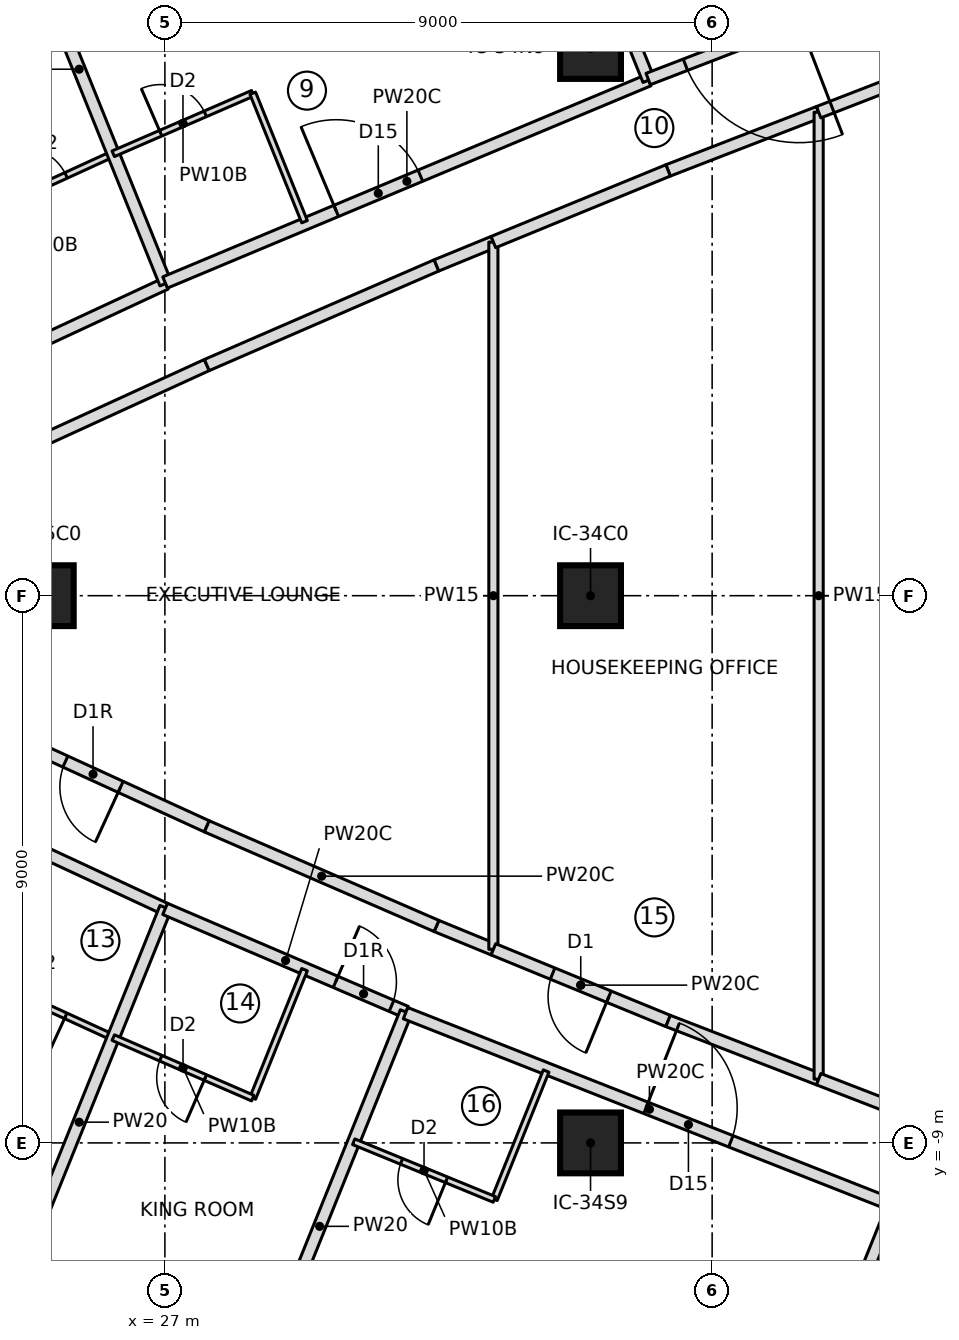
"""IFC4 building model, lengths in metres.
Left out: names, types, materials, properties, quantities, classifications, styles, units other than length and angle.
Written with IfcOpenShell. Run it as: python <this file> out.ifc"""

import sys

from ifc_helpers import new_model, si_unit, direction, frame, frame_2d, origin, origin_2d, place, context, subcontext, project, spatial, rectangle, extrude, element, fill, save


model = new_model("IFC4")
c1 = context("Model", 3, precision=1e-05, world=origin(), true_north=direction((0.0, 1.0)))
c2 = subcontext(c1, "Body", "Model", "MODEL_VIEW")
j1 = project(units=[si_unit("LENGTHUNIT", "METRE"), si_unit("PLANEANGLEUNIT", "RADIAN")], contexts=[c1])
p1 = place(None, origin())
s1 = spatial("IfcSite", under=j1, at=p1, CompositionType="ELEMENT")
p2 = place(p1, origin())
s2 = spatial("IfcBuilding", under=s1, at=p2, CompositionType="ELEMENT")
p3 = place(p2, frame((0.0, 0.0, 200.35)))
s3 = spatial("IfcBuildingStorey", under=s2, at=p3, CompositionType="ELEMENT", Elevation=200.35)
for number, where, z_axis, x_axis in (
    (1, (25.0, 0.0, 0.0), (0.0, 0.0, 1.0), (1.0, 0.0, 0.0)),
    (2, (34.0, -9.0, 0.0), (0.0, 0.0, 1.0), (1.0, 0.0, 0.0)),
    (3, (34.0, 0.0, 0.0), (0.0, 0.0, 1.0), (1.0, 0.0, 0.0)),
    (4, (34.0, 9.0, 0.0), (0.0, 0.0, 1.0), (1.0, 0.0, 0.0)),
):
    element("IfcColumn", number, at=place(p3, frame(where, z_axis=z_axis, x_axis=x_axis)), inside=s3, PredefinedType="COLUMN", context=c2, shape_type="SweptSolid", body=[
        extrude(rectangle(XDim=1.0, YDim=1.0, at=origin_2d()), origin(), (0.0, 0.0, 1.0), 3.55),
    ])
p4 = place(p3, frame((21.704, 2.663, 0.0), z_axis=(0.0, 0.0, 1.0), x_axis=(0.906619470853, 0.421949209112, 0.0)))
e5 = element("IfcWall", 5, at=p4, inside=s3, PredefinedType="PARTITIONING", context=c2, shape_type="SweptSolid", body=[
    extrude(rectangle(XDim=5.854, YDim=0.2, at=frame_2d((2.927, 0.0))), origin(), (0.0, 0.0, 1.0), 3.25),
])
p5 = place(p4, frame((0.55, 0.0, 0.0)))
e6 = element("IfcOpeningElement", 6, at=p5, cuts=e5, PredefinedType="OPENING", context=c2, shape_type="SweptSolid", body=[
    extrude(rectangle(XDim=1.5, YDim=2.1, at=frame_2d((0.75, 1.05))), frame((0.0, 0.11, 0.0), z_axis=(0.0, -1.0, 0.0), x_axis=(1.0, 0.0, 0.0)), (0.0, 0.0, 1.0), 0.22),
])
p6 = place(p3, frame((23.875, 6.226, 0.0), z_axis=(0.0, 0.0, 1.0), x_axis=(0.909145169949, 0.416479363183, 0.0)))
e7 = element("IfcWall", 7, at=p6, inside=s3, PredefinedType="PARTITIONING", context=c2, shape_type="SweptSolid", body=[
    extrude(rectangle(XDim=2.493, YDim=0.1, at=frame_2d((1.247, 0.0))), origin(), (0.0, 0.0, 1.0), 3.25),
])
p7 = place(p6, frame((0.85, 0.0, 0.0)))
e8 = element("IfcOpeningElement", 8, at=p7, cuts=e7, PredefinedType="OPENING", context=c2, shape_type="SweptSolid", body=[
    extrude(rectangle(XDim=0.8, YDim=2.1, at=frame_2d((0.4, 1.05))), frame((0.0, 0.06, 0.0), z_axis=(0.0, -1.0, 0.0), x_axis=(1.0, 0.0, 0.0)), (0.0, 0.0, 1.0), 0.12),
])
p8 = place(p3, frame((27.012, 5.133, 0.0), z_axis=(0.0, 0.0, 1.0), x_axis=(-0.373913547423, 0.927463562116, 0.0)))
e9 = element("IfcWall", 9, at=p8, inside=s3, PredefinedType="PARTITIONING", context=c2, shape_type="SweptSolid", body=[
    extrude(rectangle(XDim=7.604, YDim=0.2, at=frame_2d((3.802, 0.0))), origin(), (0.0, 0.0, 1.0), 3.25),
])
p9 = place(p3, frame((27.004, 5.151, 0.0), z_axis=(0.0, 0.0, 1.0), x_axis=(0.922490953728, 0.386018704586, 0.0)))
e10 = element("IfcWall", 10, at=p9, inside=s3, PredefinedType="PARTITIONING", context=c2, shape_type="SweptSolid", body=[
    extrude(rectangle(XDim=8.62, YDim=0.2, at=frame_2d((4.31, 0.0))), origin(), (0.0, 0.0, 1.0), 3.25),
])
p10 = place(p9, frame((3.05, 0.0, 0.0)))
e11 = element("IfcOpeningElement", 11, at=p10, cuts=e10, PredefinedType="OPENING", context=c2, shape_type="SweptSolid", body=[
    extrude(rectangle(XDim=1.5, YDim=2.1, at=frame_2d((0.75, 1.05))), frame((0.0, 0.11, 0.0), z_axis=(0.0, -1.0, 0.0), x_axis=(1.0, 0.0, 0.0)), (0.0, 0.0, 1.0), 0.22),
])
p11 = place(p3, frame((26.151, 7.268, 0.0), z_axis=(0.0, 0.0, 1.0), x_axis=(0.917378641232, 0.398015613526, 0.0)))
e12 = element("IfcWall", 12, at=p11, inside=s3, PredefinedType="PARTITIONING", context=c2, shape_type="SweptSolid", body=[
    extrude(rectangle(XDim=2.501, YDim=0.1, at=frame_2d((1.25, 0.0))), origin(), (0.0, 0.0, 1.0), 3.25),
])
p12 = place(p11, frame((0.85, 0.0, 0.0)))
e13 = element("IfcOpeningElement", 13, at=p12, cuts=e12, PredefinedType="OPENING", context=c2, shape_type="SweptSolid", body=[
    extrude(rectangle(XDim=0.8, YDim=2.1, at=frame_2d((0.4, 1.05))), frame((0.0, 0.06, 0.0), z_axis=(0.0, -1.0, 0.0), x_axis=(1.0, 0.0, 0.0)), (0.0, 0.0, 1.0), 0.12),
])
p13 = place(p3, frame((28.445, 8.263, 0.0), z_axis=(0.0, 0.0, 1.0), x_axis=(0.373902898623, -0.927467855185, 0.0)))
e14 = element("IfcWall", 14, at=p13, inside=s3, PredefinedType="PARTITIONING", context=c2, shape_type="SweptSolid", body=[
    extrude(rectangle(XDim=2.278, YDim=0.1, at=frame_2d((1.139, 0.0))), origin(), (0.0, 0.0, 1.0), 3.25),
])
p14 = place(p3, frame((34.956, 8.479, 0.0), z_axis=(0.0, 0.0, 1.0), x_axis=(-0.373881438439, 0.927476506436, 0.0)))
e15 = element("IfcWall", 15, at=p14, inside=s3, PredefinedType="PARTITIONING", context=c2, shape_type="SweptSolid", body=[
    extrude(rectangle(XDim=7.601, YDim=0.2, at=frame_2d((3.8, 0.0))), origin(), (0.0, 0.0, 1.0), 3.25),
])
p15 = place(p3, frame((38.972, 10.045, 0.0), z_axis=(0.0, 0.0, 1.0), x_axis=(-0.93335728106, -0.358948723208, 0.0)))
e16 = element("IfcWall", 16, at=p15, inside=s3, PredefinedType="PARTITIONING", context=c2, shape_type="SweptSolid", body=[
    extrude(rectangle(XDim=4.312, YDim=0.2, at=frame_2d((2.156, 0.0))), origin(), (0.0, 0.0, 1.0), 3.25),
])
p16 = place(p15, frame((1.656, 0.0, 0.0)))
e17 = element("IfcOpeningElement", 17, at=p16, cuts=e16, PredefinedType="OPENING", context=c2, shape_type="SweptSolid", body=[
    extrude(rectangle(XDim=2.0, YDim=2.4, at=frame_2d((1.0, 1.2))), frame((0.0, 0.11, 0.0), z_axis=(0.0, -1.0, 0.0), x_axis=(1.0, 0.0, 0.0)), (0.0, 0.0, 1.0), 0.22),
])
p17 = place(p3, frame((21.704, -2.685, 0.0), z_axis=(0.0, 0.0, 1.0), x_axis=(0.906628613993, -0.421929563184, 0.0)))
e18 = element("IfcWall", 18, at=p17, inside=s3, PredefinedType="PARTITIONING", context=c2, shape_type="SweptSolid", body=[
    extrude(rectangle(XDim=5.846, YDim=0.2, at=frame_2d((2.923, 0.0))), origin(), (0.0, 0.0, 1.0), 3.25),
])
p18 = place(p17, frame((0.55, 0.0, 0.0)))
e19 = element("IfcOpeningElement", 19, at=p18, cuts=e18, PredefinedType="OPENING", context=c2, shape_type="SweptSolid", body=[
    extrude(rectangle(XDim=1.5, YDim=2.1, at=frame_2d((0.75, 1.05))), frame((0.0, 0.11, 0.0), z_axis=(0.0, -1.0, 0.0), x_axis=(1.0, 0.0, 0.0)), (0.0, 0.0, 1.0), 0.22),
])
p19 = place(p3, frame((26.142, -7.264, 0.0), z_axis=(0.0, 0.0, 1.0), x_axis=(-0.909145169949, 0.416479363183, 0.0)))
e20 = element("IfcWall", 20, at=p19, inside=s3, PredefinedType="PARTITIONING", context=c2, shape_type="SweptSolid", body=[
    extrude(rectangle(XDim=2.493, YDim=0.1, at=frame_2d((1.247, 0.0))), origin(), (0.0, 0.0, 1.0), 3.25),
])
p20 = place(p19, frame((0.85, 0.0, 0.0)))
e21 = element("IfcOpeningElement", 21, at=p20, cuts=e20, PredefinedType="OPENING", context=c2, shape_type="SweptSolid", body=[
    extrude(rectangle(XDim=0.8, YDim=2.1, at=frame_2d((0.4, 1.05))), frame((0.0, 0.06, 0.0), z_axis=(0.0, -1.0, 0.0), x_axis=(1.0, 0.0, 0.0)), (0.0, 0.0, 1.0), 0.12),
])
p21 = place(p3, frame((24.168, -12.185, 0.0), z_axis=(0.0, 0.0, 1.0), x_axis=(0.373913547423, 0.927463562116, 0.0)))
e22 = element("IfcWall", 22, at=p21, inside=s3, PredefinedType="PARTITIONING", context=c2, shape_type="SweptSolid", body=[
    extrude(rectangle(XDim=7.604, YDim=0.2, at=frame_2d((3.802, 0.0))), origin(), (0.0, 0.0, 1.0), 3.25),
])
p22 = place(p3, frame((27.004, -5.151, 0.0), z_axis=(0.0, 0.0, 1.0), x_axis=(0.919259282109, -0.393652603519, 0.0)))
e23 = element("IfcWall", 23, at=p22, inside=s3, PredefinedType="PARTITIONING", context=c2, shape_type="SweptSolid", body=[
    extrude(rectangle(XDim=4.309, YDim=0.2, at=frame_2d((2.155, 0.0))), origin(), (0.0, 0.0, 1.0), 3.25),
])
p23 = place(p22, frame((3.05, 0.0, 0.0)))
e24 = element("IfcOpeningElement", 24, at=p23, cuts=e23, PredefinedType="OPENING", context=c2, shape_type="SweptSolid", body=[
    extrude(rectangle(XDim=1.0, YDim=2.1, at=frame_2d((0.5, 1.05))), frame((0.0, 0.11, 0.0), z_axis=(0.0, -1.0, 0.0), x_axis=(1.0, 0.0, 0.0)), (0.0, 0.0, 1.0), 0.22),
])
p24 = place(p3, frame((29.297, -6.151, 0.0), z_axis=(0.0, 0.0, 1.0), x_axis=(-0.373902898623, -0.927467855185, 0.0)))
e25 = element("IfcWall", 25, at=p24, inside=s3, PredefinedType="PARTITIONING", context=c2, shape_type="SweptSolid", body=[
    extrude(rectangle(XDim=2.278, YDim=0.1, at=frame_2d((1.139, 0.0))), origin(), (0.0, 0.0, 1.0), 3.25),
])
p25 = place(p3, frame((28.445, -8.263, 0.0), z_axis=(0.0, 0.0, 1.0), x_axis=(-0.917378641232, 0.398015613526, 0.0)))
e26 = element("IfcWall", 26, at=p25, inside=s3, PredefinedType="PARTITIONING", context=c2, shape_type="SweptSolid", body=[
    extrude(rectangle(XDim=2.501, YDim=0.1, at=frame_2d((1.25, 0.0))), origin(), (0.0, 0.0, 1.0), 3.25),
])
p26 = place(p25, frame((0.85, 0.0, 0.0)))
e27 = element("IfcOpeningElement", 27, at=p26, cuts=e26, PredefinedType="OPENING", context=c2, shape_type="SweptSolid", body=[
    extrude(rectangle(XDim=0.8, YDim=2.1, at=frame_2d((0.4, 1.05))), frame((0.0, 0.06, 0.0), z_axis=(0.0, -1.0, 0.0), x_axis=(1.0, 0.0, 0.0)), (0.0, 0.0, 1.0), 0.12),
])
p27 = place(p3, frame((28.124, -13.897, 0.0), z_axis=(0.0, 0.0, 1.0), x_axis=(0.373876084216, 0.927478664796, 0.0)))
e28 = element("IfcWall", 28, at=p27, inside=s3, PredefinedType="PARTITIONING", context=c2, shape_type="SweptSolid", body=[
    extrude(rectangle(XDim=7.6, YDim=0.2, at=frame_2d((3.8, 0.0))), origin(), (0.0, 0.0, 1.0), 3.25),
])
p28 = place(p3, frame((30.958, -6.866, 0.0), z_axis=(0.0, 0.0, 1.0), x_axis=(0.93040517394, -0.366532689274, 0.0)))
e29 = element("IfcWall", 29, at=p28, inside=s3, PredefinedType="PARTITIONING", context=c2, shape_type="SweptSolid", body=[
    extrude(rectangle(XDim=8.622, YDim=0.2, at=frame_2d((4.311, 0.0))), origin(), (0.0, 0.0, 1.0), 3.25),
])
p29 = place(p28, frame((4.25, 0.0, 0.0)))
e30 = element("IfcOpeningElement", 30, at=p29, cuts=e29, PredefinedType="OPENING", context=c2, shape_type="SweptSolid", body=[
    extrude(rectangle(XDim=1.5, YDim=2.1, at=frame_2d((0.75, 1.05))), frame((0.0, 0.11, 0.0), z_axis=(0.0, -1.0, 0.0), x_axis=(1.0, 0.0, 0.0)), (0.0, 0.0, 1.0), 0.22),
])
p30 = place(p3, frame((33.27, -7.818, 0.0), z_axis=(0.0, 0.0, 1.0), x_axis=(-0.373847853912, -0.927490044219, 0.0)))
e31 = element("IfcWall", 31, at=p30, inside=s3, PredefinedType="PARTITIONING", context=c2, shape_type="SweptSolid", body=[
    extrude(rectangle(XDim=2.277, YDim=0.1, at=frame_2d((1.139, 0.0))), origin(), (0.0, 0.0, 1.0), 3.25),
])
p31 = place(p3, frame((32.418, -9.93, 0.0), z_axis=(0.0, 0.0, 1.0), x_axis=(-0.92519499486, 0.379492057212, 0.0)))
e32 = element("IfcWall", 32, at=p31, inside=s3, PredefinedType="PARTITIONING", context=c2, shape_type="SweptSolid", body=[
    extrude(rectangle(XDim=2.5, YDim=0.1, at=frame_2d((1.25, 0.0))), origin(), (0.0, 0.0, 1.0), 3.25),
])
p32 = place(p31, frame((0.85, 0.0, 0.0)))
e33 = element("IfcOpeningElement", 33, at=p32, cuts=e32, PredefinedType="OPENING", context=c2, shape_type="SweptSolid", body=[
    extrude(rectangle(XDim=0.8, YDim=2.1, at=frame_2d((0.4, 1.05))), frame((0.0, 0.06, 0.0), z_axis=(0.0, -1.0, 0.0), x_axis=(1.0, 0.0, 0.0)), (0.0, 0.0, 1.0), 0.12),
])
p33 = place(p3, frame((36.137, -17.079, 0.0), z_axis=(0.0, 0.0, 1.0), x_axis=(0.373863662938, 0.927483671843, 0.0)))
e34 = element("IfcWall", 34, at=p33, inside=s3, PredefinedType="PARTITIONING", context=c2, shape_type="SweptSolid", body=[
    extrude(rectangle(XDim=7.604, YDim=0.2, at=frame_2d((3.802, 0.0))), origin(), (0.0, 0.0, 1.0), 3.25),
])
p34 = place(p3, frame((27.69, -3.793, 0.0), z_axis=(0.0, 0.0, 1.0), x_axis=(-0.909180834404, 0.416401501382, 0.0)))
e35 = element("IfcWall", 35, at=p34, inside=s3, PredefinedType="PARTITIONING", context=c2, shape_type="SweptSolid", body=[
    extrude(rectangle(XDim=4.117, YDim=0.2, at=frame_2d((2.059, 0.0))), origin(), (0.0, 0.0, 1.0), 3.25),
])
p35 = place(p34, frame((1.559, 0.0, 0.0)))
e36 = element("IfcOpeningElement", 36, at=p35, cuts=e35, PredefinedType="OPENING", context=c2, shape_type="SweptSolid", body=[
    extrude(rectangle(XDim=1.0, YDim=2.1, at=frame_2d((0.5, 1.05))), frame((0.0, 0.11, 0.0), z_axis=(0.0, -1.0, 0.0), x_axis=(1.0, 0.0, 0.0)), (0.0, 0.0, 1.0), 0.22),
])
p36 = place(p3, frame((32.402, -5.816, 0.0), z_axis=(0.0, 0.0, 1.0), x_axis=(-0.925212079844, 0.379450401648, 0.0)))
e37 = element("IfcWall", 37, at=p36, inside=s3, PredefinedType="PARTITIONING", context=c2, shape_type="SweptSolid", body=[
    extrude(rectangle(XDim=1.011, YDim=0.2, at=frame_2d((0.506, 0.0))), origin(), (0.0, 0.0, 1.0), 3.25),
])
p37 = place(p3, frame((31.467, -5.432, 0.0), z_axis=(0.0, 0.0, 1.0), x_axis=(-0.917375244839, 0.398023441717, 0.0)))
e38 = element("IfcWall", 38, at=p37, inside=s3, PredefinedType="PARTITIONING", context=c2, shape_type="SweptSolid", body=[
    extrude(rectangle(XDim=4.117, YDim=0.2, at=frame_2d((2.059, 0.0))), origin(), (0.0, 0.0, 1.0), 3.25),
])
p38 = place(p3, frame((23.947, 2.079, 0.0), z_axis=(0.0, 0.0, 1.0), x_axis=(0.909180834404, 0.416401501382, 0.0)))
e39 = element("IfcWall", 39, at=p38, inside=s3, PredefinedType="PARTITIONING", context=c2, shape_type="SweptSolid", body=[
    extrude(rectangle(XDim=4.117, YDim=0.2, at=frame_2d((2.059, 0.0))), origin(), (0.0, 0.0, 1.0), 3.25),
])
p39 = place(p3, frame((27.69, 3.793, 0.0), z_axis=(0.0, 0.0, 1.0), x_axis=(0.917375244839, 0.398023441717, 0.0)))
e40 = element("IfcWall", 40, at=p39, inside=s3, PredefinedType="PARTITIONING", context=c2, shape_type="SweptSolid", body=[
    extrude(rectangle(XDim=4.117, YDim=0.2, at=frame_2d((2.059, 0.0))), origin(), (0.0, 0.0, 1.0), 3.25),
])
p40 = place(p3, frame((31.467, 5.432, 0.0), z_axis=(0.0, 0.0, 1.0), x_axis=(0.925212079844, 0.379450401648, 0.0)))
e41 = element("IfcWall", 41, at=p40, inside=s3, PredefinedType="PARTITIONING", context=c2, shape_type="SweptSolid", body=[
    extrude(rectangle(XDim=1.011, YDim=0.2, at=frame_2d((0.506, 0.0))), origin(), (0.0, 0.0, 1.0), 3.25),
])
p41 = place(p3, frame((32.402, -5.816, 0.0), z_axis=(0.0, 0.0, 1.0), x_axis=(0.0, 1.0, 0.0)))
e42 = element("IfcWall", 42, at=p41, inside=s3, PredefinedType="PARTITIONING", context=c2, shape_type="SweptSolid", body=[
    extrude(rectangle(XDim=11.632, YDim=0.15, at=frame_2d((5.816, 0.0))), origin(), (0.0, 0.0, 1.0), 3.25),
])
p42 = place(p3, frame((35.276, -6.994, 0.0), z_axis=(0.0, 0.0, 1.0), x_axis=(-0.925204713675, 0.379468362045, 0.0)))
e43 = element("IfcWall", 43, at=p42, inside=s3, PredefinedType="PARTITIONING", context=c2, shape_type="SweptSolid", body=[
    extrude(rectangle(XDim=3.105, YDim=0.2, at=frame_2d((1.553, 0.0))), origin(), (0.0, 0.0, 1.0), 3.25),
])
p43 = place(p42, frame((1.053, 0.0, 0.0)))
e44 = element("IfcOpeningElement", 44, at=p43, cuts=e43, PredefinedType="OPENING", context=c2, shape_type="SweptSolid", body=[
    extrude(rectangle(XDim=1.0, YDim=2.1, at=frame_2d((0.5, 1.05))), frame((0.0, 0.11, 0.0), z_axis=(0.0, -1.0, 0.0), x_axis=(1.0, 0.0, 0.0)), (0.0, 0.0, 1.0), 0.22),
])
for number, where, z_axis, x_axis in (
    (45, (35.276, 6.994, 0.0), (0.0, 0.0, 1.0), (0.933, 0.361, 0.0)),
    (46, (37.752, -7.952, 0.0), (0.0, 0.0, 1.0), (-0.933, 0.361, 0.0)),
):
    element("IfcWall", number, at=place(p3, frame(where, z_axis=z_axis, x_axis=x_axis)), inside=s3, PredefinedType="PARTITIONING", context=c2, shape_type="SweptSolid", body=[
        extrude(rectangle(XDim=2.655, YDim=0.2, at=frame_2d((1.327, 0.0))), origin(), (0.0, 0.0, 1.0), 3.25),
    ])
p44 = place(p3, frame((32.402, 5.816, 0.0), z_axis=(0.0, 0.0, 1.0), x_axis=(0.925204713675, 0.379468362045, 0.0)))
e47 = element("IfcWall", 47, at=p44, inside=s3, PredefinedType="PARTITIONING", context=c2, shape_type="SweptSolid", body=[
    extrude(rectangle(XDim=3.105, YDim=0.2, at=frame_2d((1.553, 0.0))), origin(), (0.0, 0.0, 1.0), 3.25),
])
p45 = place(p3, frame((37.752, -7.952, 0.0), z_axis=(0.0, 0.0, 1.0), x_axis=(0.0, 1.0, 0.0)))
e48 = element("IfcWall", 48, at=p45, inside=s3, PredefinedType="PARTITIONING", context=c2, shape_type="SweptSolid", body=[
    extrude(rectangle(XDim=15.904, YDim=0.15, at=frame_2d((7.952, 0.0))), origin(), (0.0, 0.0, 1.0), 3.25),
])
for number, where, z_axis, x_axis in (
    (49, (39.115, -8.479, 0.0), (0.0, 0.0, 1.0), (-0.933, 0.361, 0.0)),
    (50, (37.752, 7.952, 0.0), (0.0, 0.0, 1.0), (0.933, 0.361, 0.0)),
):
    element("IfcWall", number, at=place(p3, frame(where, z_axis=z_axis, x_axis=x_axis)), inside=s3, PredefinedType="PARTITIONING", context=c2, shape_type="SweptSolid", body=[
        extrude(rectangle(XDim=1.462, YDim=0.2, at=frame_2d((0.731, 0.0))), origin(), (0.0, 0.0, 1.0), 3.25),
    ])
p46 = place(p7, origin())
e51 = element("IfcDoor", 51, at=p46, inside=s3, OperationType="SINGLE_SWING_LEFT", PredefinedType="DOOR", context=c2, shape_type="SweptSolid", body=[
    extrude(rectangle(XDim=0.8, YDim=2.1, at=frame_2d((0.4, 1.05))), frame((0.0, 0.025, 0.0), z_axis=(0.0, -1.0, 0.0), x_axis=(1.0, 0.0, 0.0)), (0.0, 0.0, 1.0), 0.05),
])
fill(e8, e51)
p47 = place(p12, origin())
e52 = element("IfcDoor", 52, at=p47, inside=s3, OperationType="SINGLE_SWING_LEFT", PredefinedType="DOOR", context=c2, shape_type="SweptSolid", body=[
    extrude(rectangle(XDim=0.8, YDim=2.1, at=frame_2d((0.4, 1.05))), frame((0.0, 0.025, 0.0), z_axis=(0.0, -1.0, 0.0), x_axis=(1.0, 0.0, 0.0)), (0.0, 0.0, 1.0), 0.05),
])
fill(e13, e52)
p48 = place(p10, origin())
e53 = element("IfcDoor", 53, at=p48, inside=s3, OperationType="DOUBLE_DOOR_SINGLE_SWING", PredefinedType="DOOR", context=c2, shape_type="SweptSolid", body=[
    extrude(rectangle(XDim=1.5, YDim=2.1, at=frame_2d((0.75, 1.05))), frame((0.0, 0.025, 0.0), z_axis=(0.0, -1.0, 0.0), x_axis=(1.0, 0.0, 0.0)), (0.0, 0.0, 1.0), 0.05),
])
fill(e11, e53)
p49 = place(p16, origin())
e54 = element("IfcDoor", 54, at=p49, inside=s3, OperationType="DOUBLE_DOOR_SINGLE_SWING", PredefinedType="DOOR", context=c2, shape_type="SweptSolid", body=[
    extrude(rectangle(XDim=2.0, YDim=2.4, at=frame_2d((1.0, 1.2))), frame((0.0, 0.025, 0.0), z_axis=(0.0, -1.0, 0.0), x_axis=(1.0, 0.0, 0.0)), (0.0, 0.0, 1.0), 0.05),
])
fill(e17, e54)
p50 = place(p20, origin())
e55 = element("IfcDoor", 55, at=p50, inside=s3, OperationType="SINGLE_SWING_LEFT", PredefinedType="DOOR", context=c2, shape_type="SweptSolid", body=[
    extrude(rectangle(XDim=0.8, YDim=2.1, at=frame_2d((0.4, 1.05))), frame((0.0, 0.025, 0.0), z_axis=(0.0, -1.0, 0.0), x_axis=(1.0, 0.0, 0.0)), (0.0, 0.0, 1.0), 0.05),
])
fill(e21, e55)
p51 = place(p26, origin())
e56 = element("IfcDoor", 56, at=p51, inside=s3, OperationType="SINGLE_SWING_LEFT", PredefinedType="DOOR", context=c2, shape_type="SweptSolid", body=[
    extrude(rectangle(XDim=0.8, YDim=2.1, at=frame_2d((0.4, 1.05))), frame((0.0, 0.025, 0.0), z_axis=(0.0, -1.0, 0.0), x_axis=(1.0, 0.0, 0.0)), (0.0, 0.0, 1.0), 0.05),
])
fill(e27, e56)
p52 = place(p23, origin())
e57 = element("IfcDoor", 57, at=p52, inside=s3, OperationType="SINGLE_SWING_RIGHT", PredefinedType="DOOR", context=c2, shape_type="SweptSolid", body=[
    extrude(rectangle(XDim=1.0, YDim=2.1, at=frame_2d((0.5, 1.05))), frame((0.0, 0.025, 0.0), z_axis=(0.0, -1.0, 0.0), x_axis=(1.0, 0.0, 0.0)), (0.0, 0.0, 1.0), 0.05),
])
fill(e24, e57)
p53 = place(p32, origin())
e58 = element("IfcDoor", 58, at=p53, inside=s3, OperationType="SINGLE_SWING_LEFT", PredefinedType="DOOR", context=c2, shape_type="SweptSolid", body=[
    extrude(rectangle(XDim=0.8, YDim=2.1, at=frame_2d((0.4, 1.05))), frame((0.0, 0.025, 0.0), z_axis=(0.0, -1.0, 0.0), x_axis=(1.0, 0.0, 0.0)), (0.0, 0.0, 1.0), 0.05),
])
fill(e33, e58)
p54 = place(p29, origin())
e59 = element("IfcDoor", 59, at=p54, inside=s3, OperationType="DOUBLE_DOOR_SINGLE_SWING", PredefinedType="DOOR", context=c2, shape_type="SweptSolid", body=[
    extrude(rectangle(XDim=1.5, YDim=2.1, at=frame_2d((0.75, 1.05))), frame((0.0, 0.025, 0.0), z_axis=(0.0, -1.0, 0.0), x_axis=(1.0, 0.0, 0.0)), (0.0, 0.0, 1.0), 0.05),
])
fill(e30, e59)
p55 = place(p35, origin())
e60 = element("IfcDoor", 60, at=p55, inside=s3, OperationType="SINGLE_SWING_RIGHT", PredefinedType="DOOR", context=c2, shape_type="SweptSolid", body=[
    extrude(rectangle(XDim=1.0, YDim=2.1, at=frame_2d((0.5, 1.05))), frame((0.0, 0.025, 0.0), z_axis=(0.0, -1.0, 0.0), x_axis=(1.0, 0.0, 0.0)), (0.0, 0.0, 1.0), 0.05),
])
fill(e36, e60)
p56 = place(p43, origin())
e61 = element("IfcDoor", 61, at=p56, inside=s3, OperationType="SINGLE_SWING_LEFT", PredefinedType="DOOR", context=c2, shape_type="SweptSolid", body=[
    extrude(rectangle(XDim=1.0, YDim=2.1, at=frame_2d((0.5, 1.05))), frame((0.0, 0.025, 0.0), z_axis=(0.0, -1.0, 0.0), x_axis=(1.0, 0.0, 0.0)), (0.0, 0.0, 1.0), 0.05),
])
fill(e44, e61)
save(model, sys.argv[1])
